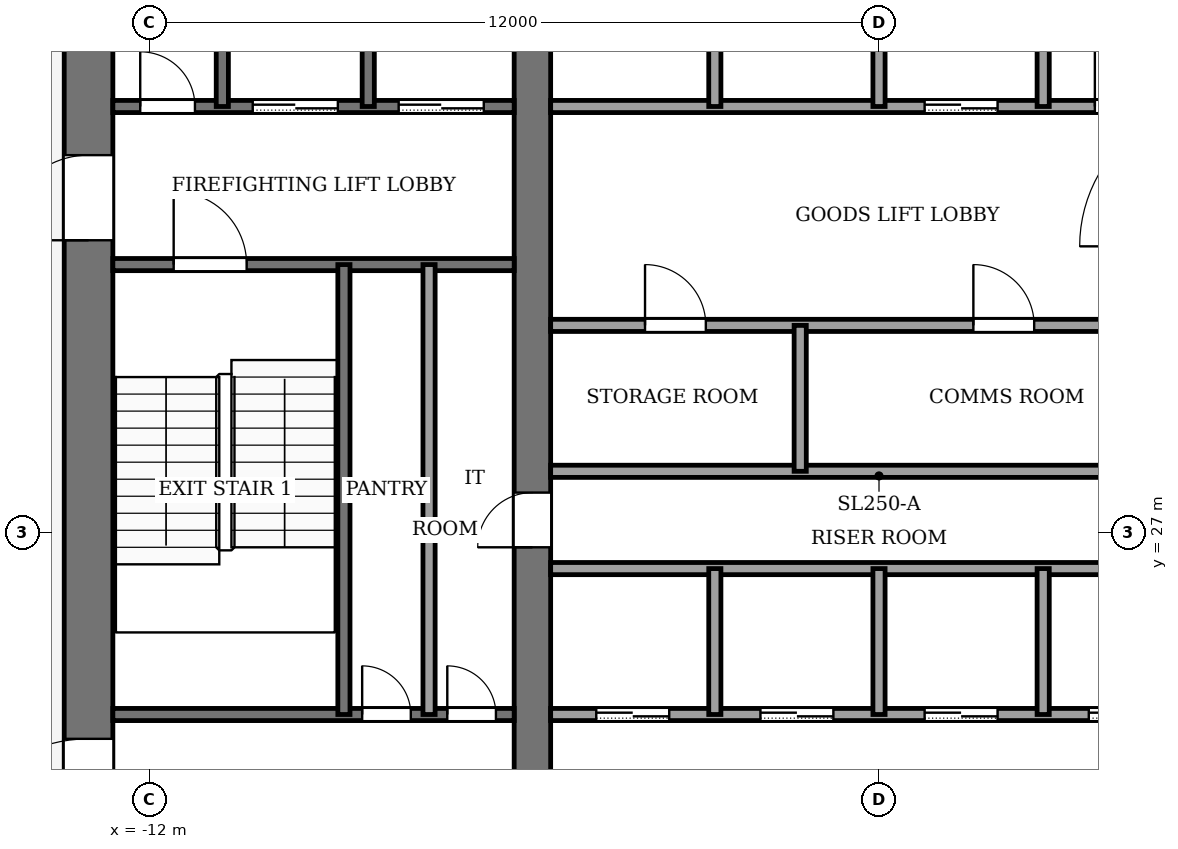
"""IFC4 building model, lengths in metres.
Left out: names, types, materials, properties, quantities, classifications, styles, units other than length and angle.
Written with IfcOpenShell. Run it as: python <this file> out.ifc"""

import sys

from ifc_helpers import new_model, si_unit, direction, frame, frame_2d, origin, place, context, subcontext, project, spatial, rectangle, extrude, element, fill, save


model = new_model("IFC4")
c1 = context("Model", 3, precision=1e-05, world=origin(), true_north=direction((0.0, 1.0)))
c2 = subcontext(c1, "Body", "Model", "MODEL_VIEW")
j1 = project(units=[si_unit("LENGTHUNIT", "METRE"), si_unit("PLANEANGLEUNIT", "RADIAN")], contexts=[c1])
p1 = place(None, origin())
s1 = spatial("IfcSite", under=j1, at=p1, CompositionType="ELEMENT")
p2 = place(p1, origin())
s2 = spatial("IfcBuilding", under=s1, at=p2, CompositionType="ELEMENT")
p3 = place(p2, frame((0.0, 0.0, 254.0)))
s3 = spatial("IfcBuildingStorey", under=s2, at=p3, CompositionType="ELEMENT", Elevation=254.0)
p4 = place(p3, frame((-13.0, 18.4, -0.13), z_axis=(0.0, 0.0, 1.0), x_axis=(0.0, 1.0, 0.0)))
e1 = element("IfcWall", 1, at=p4, inside=s3, PredefinedType="SHEAR", context=c2, shape_type="SweptSolid", body=[
    extrude(rectangle(XDim=19.2, YDim=0.8, at=frame_2d((9.6, 0.0))), origin(), (0.0, 0.0, 1.0), 4.0),
])
p5 = place(p4, frame((2.8, 0.0, 0.13)))
e2 = element("IfcOpeningElement", 2, at=p5, cuts=e1, PredefinedType="OPENING", context=c2, shape_type="SweptSolid", body=[
    extrude(rectangle(XDim=2.4, YDim=2.4, at=frame_2d((1.2, 1.2))), frame((0.0, 0.41, 0.0), z_axis=(0.0, -1.0, 0.0), x_axis=(1.0, 0.0, 0.0)), (0.0, 0.0, 1.0), 0.82),
])
p6 = place(p4, frame((13.4, 0.0, 0.13)))
e3 = element("IfcOpeningElement", 3, at=p6, cuts=e1, PredefinedType="OPENING", context=c2, shape_type="SweptSolid", body=[
    extrude(rectangle(XDim=1.4, YDim=2.2, at=frame_2d((0.7, 1.1))), frame((0.0, 0.41, 0.0), z_axis=(0.0, -1.0, 0.0), x_axis=(1.0, 0.0, 0.0)), (0.0, 0.0, 1.0), 0.82),
])
p7 = place(p3, frame((-5.7, 18.4, -0.13), z_axis=(0.0, 0.0, 1.0), x_axis=(0.0, 1.0, 0.0)))
e4 = element("IfcWall", 4, at=p7, inside=s3, PredefinedType="SHEAR", context=c2, shape_type="SweptSolid", body=[
    extrude(rectangle(XDim=19.2, YDim=0.6, at=frame_2d((9.6, 0.0))), origin(), (0.0, 0.0, 1.0), 4.0),
])
p8 = place(p7, frame((8.35, 0.0, 0.13)))
e5 = element("IfcOpeningElement", 5, at=p8, cuts=e4, PredefinedType="OPENING", context=c2, shape_type="SweptSolid", body=[
    extrude(rectangle(XDim=0.9, YDim=2.1, at=frame_2d((0.45, 1.05))), frame((0.0, 0.31, 0.0), z_axis=(0.0, -1.0, 0.0), x_axis=(1.0, 0.0, 0.0)), (0.0, 0.0, 1.0), 0.62),
])
p9 = place(p3, frame((-12.6, 24.0, 0.0), z_axis=(0.0, 0.0, 1.0), x_axis=(1.0, 0.0, 0.0)))
e6 = element("IfcWall", 6, at=p9, inside=s3, PredefinedType="PARTITIONING", context=c2, shape_type="SweptSolid", body=[
    extrude(rectangle(XDim=6.6, YDim=0.2, at=frame_2d((3.3, 0.0))), origin(), (0.0, 0.0, 1.0), 3.87),
])
p10 = place(p9, frame((4.1, 0.0, 0.0)))
e7 = element("IfcOpeningElement", 7, at=p10, cuts=e6, PredefinedType="OPENING", context=c2, shape_type="SweptSolid", body=[
    extrude(rectangle(XDim=0.8, YDim=2.1, at=frame_2d((0.4, 1.05))), frame((0.0, 0.11, 0.0), z_axis=(0.0, -1.0, 0.0), x_axis=(1.0, 0.0, 0.0)), (0.0, 0.0, 1.0), 0.22),
])
p11 = place(p9, frame((5.5, 0.0, 0.0)))
e8 = element("IfcOpeningElement", 8, at=p11, cuts=e6, PredefinedType="OPENING", context=c2, shape_type="SweptSolid", body=[
    extrude(rectangle(XDim=0.8, YDim=2.1, at=frame_2d((0.4, 1.05))), frame((0.0, 0.11, 0.0), z_axis=(0.0, -1.0, 0.0), x_axis=(1.0, 0.0, 0.0)), (0.0, 0.0, 1.0), 0.22),
])
p12 = place(p3, frame((-5.4, 24.0, 0.0), z_axis=(0.0, 0.0, 1.0), x_axis=(1.0, 0.0, 0.0)))
e9 = element("IfcWall", 9, at=p12, inside=s3, PredefinedType="PARTITIONING", context=c2, shape_type="SweptSolid", body=[
    extrude(rectangle(XDim=10.8, YDim=0.2, at=frame_2d((5.4, 0.0))), origin(), (0.0, 0.0, 1.0), 3.87),
])
p13 = place(p12, frame((0.75, 0.0, 0.0)))
e10 = element("IfcOpeningElement", 10, at=p13, cuts=e9, PredefinedType="OPENING", context=c2, shape_type="SweptSolid", body=[
    extrude(rectangle(XDim=1.2, YDim=2.2, at=frame_2d((0.6, 1.1))), frame((0.0, 0.11, 0.0), z_axis=(0.0, -1.0, 0.0), x_axis=(1.0, 0.0, 0.0)), (0.0, 0.0, 1.0), 0.22),
])
p14 = place(p12, frame((3.45, 0.0, 0.0)))
e11 = element("IfcOpeningElement", 11, at=p14, cuts=e9, PredefinedType="OPENING", context=c2, shape_type="SweptSolid", body=[
    extrude(rectangle(XDim=1.2, YDim=2.2, at=frame_2d((0.6, 1.1))), frame((0.0, 0.11, 0.0), z_axis=(0.0, -1.0, 0.0), x_axis=(1.0, 0.0, 0.0)), (0.0, 0.0, 1.0), 0.22),
])
p15 = place(p12, frame((6.15, 0.0, 0.0)))
e12 = element("IfcOpeningElement", 12, at=p15, cuts=e9, PredefinedType="OPENING", context=c2, shape_type="SweptSolid", body=[
    extrude(rectangle(XDim=1.2, YDim=2.2, at=frame_2d((0.6, 1.1))), frame((0.0, 0.11, 0.0), z_axis=(0.0, -1.0, 0.0), x_axis=(1.0, 0.0, 0.0)), (0.0, 0.0, 1.0), 0.22),
])
p16 = place(p12, frame((8.85, 0.0, 0.0)))
e13 = element("IfcOpeningElement", 13, at=p16, cuts=e9, PredefinedType="OPENING", context=c2, shape_type="SweptSolid", body=[
    extrude(rectangle(XDim=1.2, YDim=2.2, at=frame_2d((0.6, 1.1))), frame((0.0, 0.11, 0.0), z_axis=(0.0, -1.0, 0.0), x_axis=(1.0, 0.0, 0.0)), (0.0, 0.0, 1.0), 0.22),
])
for number, where, z_axis, x_axis in (
    (14, (-5.4, 26.4, 0.0), (0.0, 0.0, 1.0), (1.0, 0.0, 0.0)),
    (15, (-5.4, 28.0, 0.0), (0.0, 0.0, 1.0), (1.0, 0.0, 0.0)),
):
    element("IfcWall", number, at=place(p3, frame(where, z_axis=z_axis, x_axis=x_axis)), inside=s3, PredefinedType="PARTITIONING", context=c2, shape_type="SweptSolid", body=[
        extrude(rectangle(XDim=10.8, YDim=0.2, at=frame_2d((5.4, 0.0))), origin(), (0.0, 0.0, 1.0), 3.87),
    ])
p17 = place(p3, frame((-5.4, 30.4, 0.0), z_axis=(0.0, 0.0, 1.0), x_axis=(1.0, 0.0, 0.0)))
e16 = element("IfcWall", 16, at=p17, inside=s3, PredefinedType="PARTITIONING", context=c2, shape_type="SweptSolid", body=[
    extrude(rectangle(XDim=10.8, YDim=0.2, at=frame_2d((5.4, 0.0))), origin(), (0.0, 0.0, 1.0), 3.87),
])
p18 = place(p17, frame((1.552, 0.0, 0.0)))
e17 = element("IfcOpeningElement", 17, at=p18, cuts=e16, PredefinedType="OPENING", context=c2, shape_type="SweptSolid", body=[
    extrude(rectangle(XDim=1.0, YDim=2.1, at=frame_2d((0.5, 1.05))), frame((0.0, 0.11, 0.0), z_axis=(0.0, -1.0, 0.0), x_axis=(1.0, 0.0, 0.0)), (0.0, 0.0, 1.0), 0.22),
])
p19 = place(p17, frame((6.952, 0.0, 0.0)))
e18 = element("IfcOpeningElement", 18, at=p19, cuts=e16, PredefinedType="OPENING", context=c2, shape_type="SweptSolid", body=[
    extrude(rectangle(XDim=1.0, YDim=2.1, at=frame_2d((0.5, 1.05))), frame((0.0, 0.11, 0.0), z_axis=(0.0, -1.0, 0.0), x_axis=(1.0, 0.0, 0.0)), (0.0, 0.0, 1.0), 0.22),
])
p20 = place(p3, frame((-12.6, 31.4, 0.0), z_axis=(0.0, 0.0, 1.0), x_axis=(1.0, 0.0, 0.0)))
e19 = element("IfcWall", 19, at=p20, inside=s3, PredefinedType="PARTITIONING", context=c2, shape_type="SweptSolid", body=[
    extrude(rectangle(XDim=6.6, YDim=0.2, at=frame_2d((3.3, 0.0))), origin(), (0.0, 0.0, 1.0), 3.87),
])
p21 = place(p20, frame((1.0, 0.0, 0.0)))
e20 = element("IfcOpeningElement", 20, at=p21, cuts=e19, PredefinedType="OPENING", context=c2, shape_type="SweptSolid", body=[
    extrude(rectangle(XDim=1.2, YDim=2.2, at=frame_2d((0.6, 1.1))), frame((0.0, 0.11, 0.0), z_axis=(0.0, -1.0, 0.0), x_axis=(1.0, 0.0, 0.0)), (0.0, 0.0, 1.0), 0.22),
])
p22 = place(p3, frame((-12.6, 34.0, 0.0), z_axis=(0.0, 0.0, 1.0), x_axis=(1.0, 0.0, 0.0)))
e21 = element("IfcWall", 21, at=p22, inside=s3, PredefinedType="PARTITIONING", context=c2, shape_type="SweptSolid", body=[
    extrude(rectangle(XDim=6.6, YDim=0.2, at=frame_2d((3.3, 0.0))), origin(), (0.0, 0.0, 1.0), 3.87),
])
p23 = place(p22, frame((4.7, 0.0, 0.0)))
e22 = element("IfcOpeningElement", 22, at=p23, cuts=e21, PredefinedType="OPENING", context=c2, shape_type="SweptSolid", body=[
    extrude(rectangle(XDim=1.4, YDim=2.2, at=frame_2d((0.7, 1.1))), frame((0.0, 0.11, 0.0), z_axis=(0.0, -1.0, 0.0), x_axis=(1.0, 0.0, 0.0)), (0.0, 0.0, 1.0), 0.22),
])
p24 = place(p22, frame((2.3, 0.0, 0.0)))
e23 = element("IfcOpeningElement", 23, at=p24, cuts=e21, PredefinedType="OPENING", context=c2, shape_type="SweptSolid", body=[
    extrude(rectangle(XDim=1.4, YDim=2.2, at=frame_2d((0.7, 1.1))), frame((0.0, 0.11, 0.0), z_axis=(0.0, -1.0, 0.0), x_axis=(1.0, 0.0, 0.0)), (0.0, 0.0, 1.0), 0.22),
])
p25 = place(p22, frame((0.45, 0.0, 0.0)))
e24 = element("IfcOpeningElement", 24, at=p25, cuts=e21, PredefinedType="OPENING", context=c2, shape_type="SweptSolid", body=[
    extrude(rectangle(XDim=0.9, YDim=2.1, at=frame_2d((0.45, 1.05))), frame((0.0, 0.11, 0.0), z_axis=(0.0, -1.0, 0.0), x_axis=(1.0, 0.0, 0.0)), (0.0, 0.0, 1.0), 0.22),
])
p26 = place(p3, frame((-5.4, 34.0, 0.0), z_axis=(0.0, 0.0, 1.0), x_axis=(1.0, 0.0, 0.0)))
e25 = element("IfcWall", 25, at=p26, inside=s3, PredefinedType="PARTITIONING", context=c2, shape_type="SweptSolid", body=[
    extrude(rectangle(XDim=10.8, YDim=0.2, at=frame_2d((5.4, 0.0))), origin(), (0.0, 0.0, 1.0), 3.87),
])
p27 = place(p26, frame((6.15, 0.0, 0.0)))
e26 = element("IfcOpeningElement", 26, at=p27, cuts=e25, PredefinedType="OPENING", context=c2, shape_type="SweptSolid", body=[
    extrude(rectangle(XDim=1.2, YDim=2.2, at=frame_2d((0.6, 1.1))), frame((0.0, 0.11, 0.0), z_axis=(0.0, -1.0, 0.0), x_axis=(1.0, 0.0, 0.0)), (0.0, 0.0, 1.0), 0.22),
])
p28 = place(p26, frame((8.95, 0.0, 0.0)))
e27 = element("IfcOpeningElement", 27, at=p28, cuts=e25, PredefinedType="OPENING", context=c2, shape_type="SweptSolid", body=[
    extrude(rectangle(XDim=1.0, YDim=2.1, at=frame_2d((0.5, 1.05))), frame((0.0, 0.11, 0.0), z_axis=(0.0, -1.0, 0.0), x_axis=(1.0, 0.0, 0.0)), (0.0, 0.0, 1.0), 0.22),
])
p29 = place(p3, frame((-10.8, 34.0, 0.0), z_axis=(0.0, 0.0, 1.0), x_axis=(0.0, 1.0, 0.0)))
e28 = element("IfcWall", 28, at=p29, inside=s3, PredefinedType="PARTITIONING", context=c2, shape_type="SweptSolid", body=[
    extrude(rectangle(XDim=3.6, YDim=0.2, at=frame_2d((1.8, 0.0))), origin(), (0.0, 0.0, 1.0), 3.87),
])
p30 = place(p3, frame((-8.8, 24.0, 0.0), z_axis=(0.0, 0.0, 1.0), x_axis=(0.0, 1.0, 0.0)))
e29 = element("IfcWall", 29, at=p30, inside=s3, PredefinedType="PARTITIONING", context=c2, shape_type="SweptSolid", body=[
    extrude(rectangle(XDim=7.4, YDim=0.2, at=frame_2d((3.7, 0.0))), origin(), (0.0, 0.0, 1.0), 3.87),
])
p31 = place(p3, frame((-8.4, 34.0, 0.0), z_axis=(0.0, 0.0, 1.0), x_axis=(0.0, 1.0, 0.0)))
e30 = element("IfcWall", 30, at=p31, inside=s3, PredefinedType="PARTITIONING", context=c2, shape_type="SweptSolid", body=[
    extrude(rectangle(XDim=3.6, YDim=0.2, at=frame_2d((1.8, 0.0))), origin(), (0.0, 0.0, 1.0), 3.87),
])
p32 = place(p3, frame((-7.4, 24.0, 0.0), z_axis=(0.0, 0.0, 1.0), x_axis=(0.0, 1.0, 0.0)))
e31 = element("IfcWall", 31, at=p32, inside=s3, PredefinedType="PARTITIONING", context=c2, shape_type="SweptSolid", body=[
    extrude(rectangle(XDim=7.4, YDim=0.2, at=frame_2d((3.7, 0.0))), origin(), (0.0, 0.0, 1.0), 3.87),
])
p33 = place(p3, frame((-2.7, 24.0, 0.0), z_axis=(0.0, 0.0, 1.0), x_axis=(0.0, 1.0, 0.0)))
e32 = element("IfcWall", 32, at=p33, inside=s3, PredefinedType="PARTITIONING", context=c2, shape_type="SweptSolid", body=[
    extrude(rectangle(XDim=2.4, YDim=0.2, at=frame_2d((1.2, 0.0))), origin(), (0.0, 0.0, 1.0), 3.87),
])
p34 = place(p3, frame((-2.7, 34.0, 0.0), z_axis=(0.0, 0.0, 1.0), x_axis=(0.0, 1.0, 0.0)))
e33 = element("IfcWall", 33, at=p34, inside=s3, PredefinedType="PARTITIONING", context=c2, shape_type="SweptSolid", body=[
    extrude(rectangle(XDim=3.6, YDim=0.2, at=frame_2d((1.8, 0.0))), origin(), (0.0, 0.0, 1.0), 3.87),
])
for number, where, z_axis, x_axis in (
    (34, (-1.296, 28.0, 0.0), (0.0, 0.0, 1.0), (0.0, 1.0, 0.0)),
    (35, (0.0, 24.0, 0.0), (0.0, 0.0, 1.0), (0.0, 1.0, 0.0)),
):
    element("IfcWall", number, at=place(p3, frame(where, z_axis=z_axis, x_axis=x_axis)), inside=s3, PredefinedType="PARTITIONING", context=c2, shape_type="SweptSolid", body=[
        extrude(rectangle(XDim=2.4, YDim=0.2, at=frame_2d((1.2, 0.0))), origin(), (0.0, 0.0, 1.0), 3.87),
    ])
p35 = place(p3, frame((0.0, 34.0, 0.0), z_axis=(0.0, 0.0, 1.0), x_axis=(0.0, 1.0, 0.0)))
e36 = element("IfcWall", 36, at=p35, inside=s3, PredefinedType="PARTITIONING", context=c2, shape_type="SweptSolid", body=[
    extrude(rectangle(XDim=3.6, YDim=0.2, at=frame_2d((1.8, 0.0))), origin(), (0.0, 0.0, 1.0), 3.87),
])
p36 = place(p3, frame((2.7, 24.0, 0.0), z_axis=(0.0, 0.0, 1.0), x_axis=(0.0, 1.0, 0.0)))
e37 = element("IfcWall", 37, at=p36, inside=s3, PredefinedType="PARTITIONING", context=c2, shape_type="SweptSolid", body=[
    extrude(rectangle(XDim=2.4, YDim=0.2, at=frame_2d((1.2, 0.0))), origin(), (0.0, 0.0, 1.0), 3.87),
])
p37 = place(p3, frame((2.7, 34.0, 0.0), z_axis=(0.0, 0.0, 1.0), x_axis=(0.0, 1.0, 0.0)))
e38 = element("IfcWall", 38, at=p37, inside=s3, PredefinedType="PARTITIONING", context=c2, shape_type="SweptSolid", body=[
    extrude(rectangle(XDim=3.6, YDim=0.2, at=frame_2d((1.8, 0.0))), origin(), (0.0, 0.0, 1.0), 3.87),
])
p38 = place(p13, origin())
e39 = element("IfcDoor", 39, at=p38, inside=s3, OperationType="SLIDING_TO_LEFT", PredefinedType="DOOR", context=c2, shape_type="SweptSolid", body=[
    extrude(rectangle(XDim=1.2, YDim=2.2, at=frame_2d((0.6, 1.1))), frame((0.0, 0.025, 0.0), z_axis=(0.0, -1.0, 0.0), x_axis=(1.0, 0.0, 0.0)), (0.0, 0.0, 1.0), 0.05),
])
fill(e10, e39)
p39 = place(p14, origin())
e40 = element("IfcDoor", 40, at=p39, inside=s3, OperationType="SLIDING_TO_LEFT", PredefinedType="DOOR", context=c2, shape_type="SweptSolid", body=[
    extrude(rectangle(XDim=1.2, YDim=2.2, at=frame_2d((0.6, 1.1))), frame((0.0, 0.025, 0.0), z_axis=(0.0, -1.0, 0.0), x_axis=(1.0, 0.0, 0.0)), (0.0, 0.0, 1.0), 0.05),
])
fill(e11, e40)
p40 = place(p15, origin())
e41 = element("IfcDoor", 41, at=p40, inside=s3, OperationType="SLIDING_TO_LEFT", PredefinedType="DOOR", context=c2, shape_type="SweptSolid", body=[
    extrude(rectangle(XDim=1.2, YDim=2.2, at=frame_2d((0.6, 1.1))), frame((0.0, 0.025, 0.0), z_axis=(0.0, -1.0, 0.0), x_axis=(1.0, 0.0, 0.0)), (0.0, 0.0, 1.0), 0.05),
])
fill(e12, e41)
p41 = place(p16, origin())
e42 = element("IfcDoor", 42, at=p41, inside=s3, OperationType="SLIDING_TO_LEFT", PredefinedType="DOOR", context=c2, shape_type="SweptSolid", body=[
    extrude(rectangle(XDim=1.2, YDim=2.2, at=frame_2d((0.6, 1.1))), frame((0.0, 0.025, 0.0), z_axis=(0.0, -1.0, 0.0), x_axis=(1.0, 0.0, 0.0)), (0.0, 0.0, 1.0), 0.05),
])
fill(e13, e42)
p42 = place(p27, origin())
e43 = element("IfcDoor", 43, at=p42, inside=s3, OperationType="SLIDING_TO_LEFT", PredefinedType="DOOR", context=c2, shape_type="SweptSolid", body=[
    extrude(rectangle(XDim=1.2, YDim=2.2, at=frame_2d((0.6, 1.1))), frame((0.0, 0.025, 0.0), z_axis=(0.0, -1.0, 0.0), x_axis=(1.0, 0.0, 0.0)), (0.0, 0.0, 1.0), 0.05),
])
fill(e26, e43)
p43 = place(p23, origin())
e44 = element("IfcDoor", 44, at=p43, inside=s3, OperationType="SLIDING_TO_LEFT", PredefinedType="DOOR", context=c2, shape_type="SweptSolid", body=[
    extrude(rectangle(XDim=1.4, YDim=2.2, at=frame_2d((0.7, 1.1))), frame((0.0, 0.025, 0.0), z_axis=(0.0, -1.0, 0.0), x_axis=(1.0, 0.0, 0.0)), (0.0, 0.0, 1.0), 0.05),
])
fill(e22, e44)
p44 = place(p24, origin())
e45 = element("IfcDoor", 45, at=p44, inside=s3, OperationType="SLIDING_TO_LEFT", PredefinedType="DOOR", context=c2, shape_type="SweptSolid", body=[
    extrude(rectangle(XDim=1.4, YDim=2.2, at=frame_2d((0.7, 1.1))), frame((0.0, 0.025, 0.0), z_axis=(0.0, -1.0, 0.0), x_axis=(1.0, 0.0, 0.0)), (0.0, 0.0, 1.0), 0.05),
])
fill(e23, e45)
p45 = place(p25, origin())
e46 = element("IfcDoor", 46, at=p45, inside=s3, OperationType="SINGLE_SWING_RIGHT", PredefinedType="DOOR", context=c2, shape_type="SweptSolid", body=[
    extrude(rectangle(XDim=0.9, YDim=2.1, at=frame_2d((0.45, 1.05))), frame((0.0, 0.025, 0.0), z_axis=(0.0, -1.0, 0.0), x_axis=(1.0, 0.0, 0.0)), (0.0, 0.0, 1.0), 0.05),
])
fill(e24, e46)
p46 = place(p18, origin())
e47 = element("IfcDoor", 47, at=p46, inside=s3, OperationType="SINGLE_SWING_LEFT", PredefinedType="DOOR", context=c2, shape_type="SweptSolid", body=[
    extrude(rectangle(XDim=1.0, YDim=2.1, at=frame_2d((0.5, 1.05))), frame((0.0, 0.025, 0.0), z_axis=(0.0, -1.0, 0.0), x_axis=(1.0, 0.0, 0.0)), (0.0, 0.0, 1.0), 0.05),
])
fill(e17, e47)
p47 = place(p19, origin())
e48 = element("IfcDoor", 48, at=p47, inside=s3, OperationType="SINGLE_SWING_RIGHT", PredefinedType="DOOR", context=c2, shape_type="SweptSolid", body=[
    extrude(rectangle(XDim=1.0, YDim=2.1, at=frame_2d((0.5, 1.05))), frame((0.0, 0.025, 0.0), z_axis=(0.0, -1.0, 0.0), x_axis=(1.0, 0.0, 0.0)), (0.0, 0.0, 1.0), 0.05),
])
fill(e18, e48)
p48 = place(p10, origin())
e49 = element("IfcDoor", 49, at=p48, inside=s3, OperationType="SINGLE_SWING_LEFT", PredefinedType="DOOR", context=c2, shape_type="SweptSolid", body=[
    extrude(rectangle(XDim=0.8, YDim=2.1, at=frame_2d((0.4, 1.05))), frame((0.0, 0.025, 0.0), z_axis=(0.0, -1.0, 0.0), x_axis=(1.0, 0.0, 0.0)), (0.0, 0.0, 1.0), 0.05),
])
fill(e7, e49)
p49 = place(p11, origin())
e50 = element("IfcDoor", 50, at=p49, inside=s3, OperationType="SINGLE_SWING_RIGHT", PredefinedType="DOOR", context=c2, shape_type="SweptSolid", body=[
    extrude(rectangle(XDim=0.8, YDim=2.1, at=frame_2d((0.4, 1.05))), frame((0.0, 0.025, 0.0), z_axis=(0.0, -1.0, 0.0), x_axis=(1.0, 0.0, 0.0)), (0.0, 0.0, 1.0), 0.05),
])
fill(e8, e50)
p50 = place(p28, origin())
e51 = element("IfcDoor", 51, at=p50, inside=s3, OperationType="SINGLE_SWING_LEFT", PredefinedType="DOOR", context=c2, shape_type="SweptSolid", body=[
    extrude(rectangle(XDim=1.0, YDim=2.1, at=frame_2d((0.5, 1.05))), frame((0.0, 0.025, 0.0), z_axis=(0.0, -1.0, 0.0), x_axis=(1.0, 0.0, 0.0)), (0.0, 0.0, 1.0), 0.05),
])
fill(e27, e51)
p51 = place(p8, origin())
e52 = element("IfcDoor", 52, at=p51, inside=s3, OperationType="SINGLE_SWING_RIGHT", PredefinedType="DOOR", context=c2, shape_type="SweptSolid", body=[
    extrude(rectangle(XDim=0.9, YDim=2.1, at=frame_2d((0.45, 1.05))), frame((0.0, 0.025, 0.0), z_axis=(0.0, -1.0, 0.0), x_axis=(1.0, 0.0, 0.0)), (0.0, 0.0, 1.0), 0.05),
])
fill(e5, e52)
p52 = place(p21, origin())
e53 = element("IfcDoor", 53, at=p52, inside=s3, OperationType="SINGLE_SWING_RIGHT", PredefinedType="DOOR", context=c2, shape_type="SweptSolid", body=[
    extrude(rectangle(XDim=1.2, YDim=2.2, at=frame_2d((0.6, 1.1))), frame((0.0, 0.025, 0.0), z_axis=(0.0, -1.0, 0.0), x_axis=(1.0, 0.0, 0.0)), (0.0, 0.0, 1.0), 0.05),
])
fill(e20, e53)
p53 = place(p5, origin())
e54 = element("IfcDoor", 54, at=p53, inside=s3, OperationType="DOUBLE_DOOR_SINGLE_SWING", PredefinedType="DOOR", context=c2, shape_type="SweptSolid", body=[
    extrude(rectangle(XDim=2.4, YDim=2.4, at=frame_2d((1.2, 1.2))), frame((0.0, 0.025, 0.0), z_axis=(0.0, -1.0, 0.0), x_axis=(1.0, 0.0, 0.0)), (0.0, 0.0, 1.0), 0.05),
])
fill(e2, e54)
p54 = place(p6, origin())
e55 = element("IfcDoor", 55, at=p54, inside=s3, OperationType="SINGLE_SWING_RIGHT", PredefinedType="DOOR", context=c2, shape_type="SweptSolid", body=[
    extrude(rectangle(XDim=1.4, YDim=2.2, at=frame_2d((0.7, 1.1))), frame((0.0, 0.025, 0.0), z_axis=(0.0, -1.0, 0.0), x_axis=(1.0, 0.0, 0.0)), (0.0, 0.0, 1.0), 0.05),
])
fill(e3, e55)
save(model, sys.argv[1])
